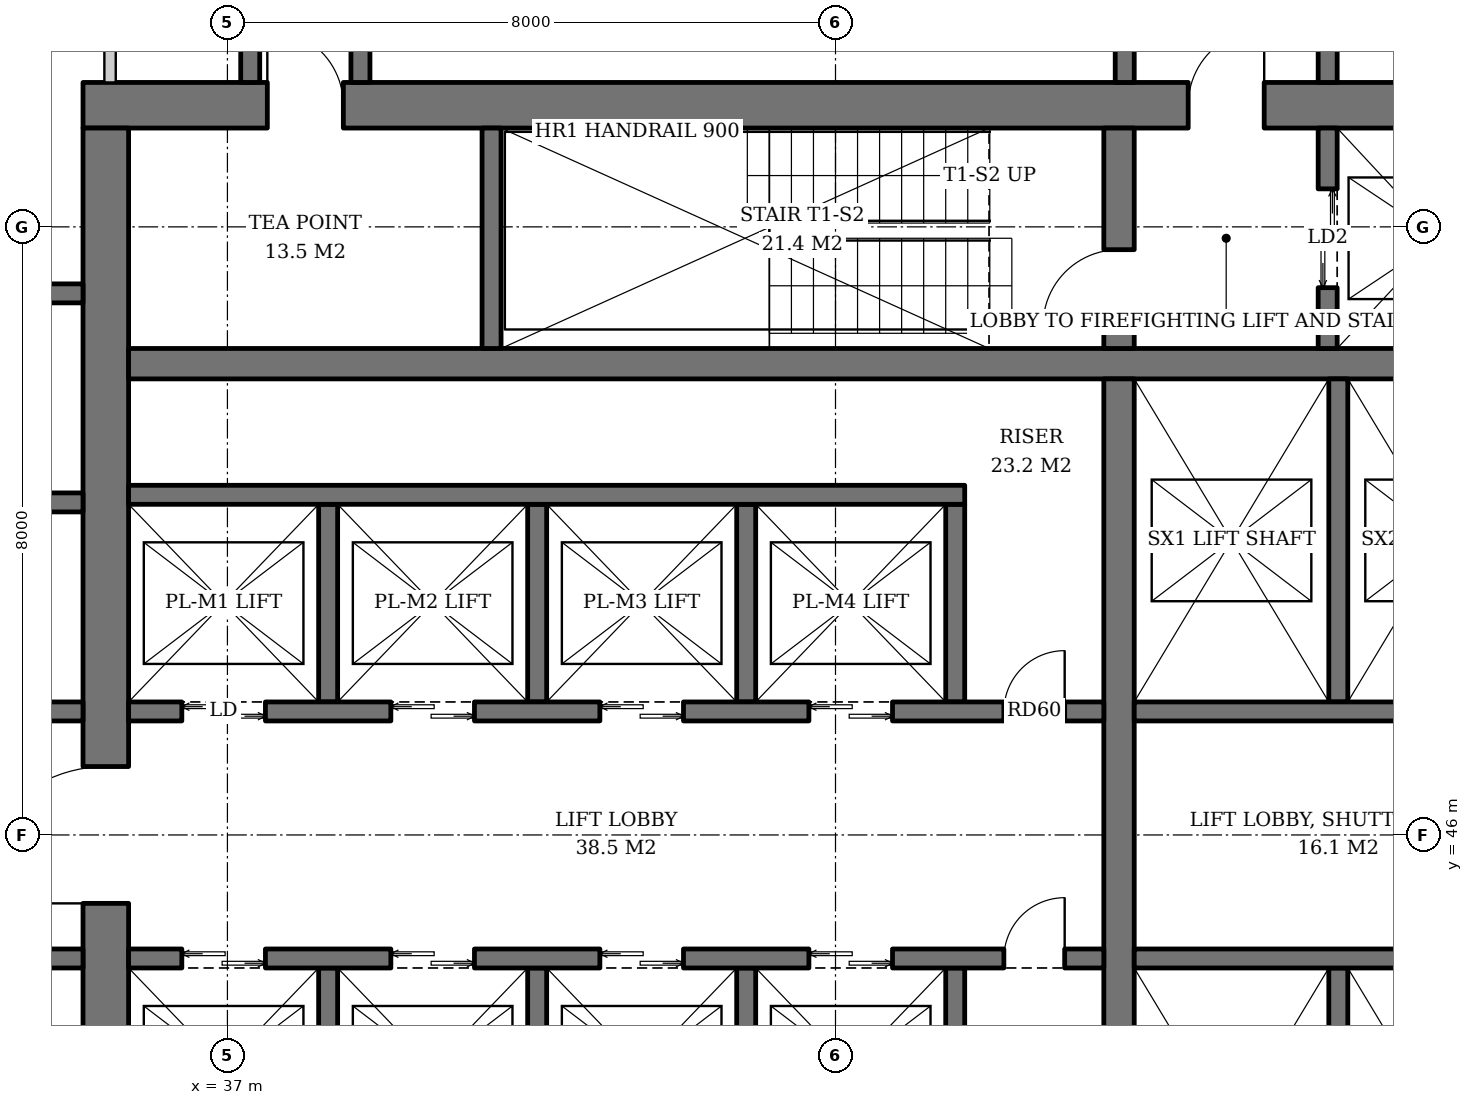
"""IFC4 building model, lengths in metres.
Left out: names, types, materials, properties, quantities, classifications, styles, units other than length and angle.
Written with IfcOpenShell. Run it as: python <this file> out.ifc"""

import sys

from ifc_helpers import new_model, si_unit, direction, frame, frame_2d, origin, place, context, subcontext, project, spatial, rectangle, extrude, element, fill, save


model = new_model("IFC4")
c1 = context("Model", 3, precision=1e-05, world=origin(), true_north=direction((0.0, 1.0)))
c2 = subcontext(c1, "Body", "Model", "MODEL_VIEW")
j1 = project(units=[si_unit("LENGTHUNIT", "METRE"), si_unit("PLANEANGLEUNIT", "RADIAN")], contexts=[c1])
p1 = place(None, origin())
s1 = spatial("IfcSite", under=j1, at=p1, CompositionType="ELEMENT")
p2 = place(p1, origin())
s2 = spatial("IfcBuilding", under=s1, at=p2, CompositionType="ELEMENT")
p3 = place(p2, frame((0.0, 0.0, 108.4)))
s3 = spatial("IfcBuildingStorey", under=s2, at=p3, CompositionType="ELEMENT", Elevation=108.4)
p4 = place(p3, frame((35.1, 55.6, 0.0), z_axis=(0.0, 0.0, 1.0), x_axis=(1.0, 0.0, 0.0)))
e1 = element("IfcWall", 1, at=p4, inside=s3, PredefinedType="SHEAR", context=c2, shape_type="SweptSolid", body=[
    extrude(rectangle(XDim=19.8, YDim=0.6, at=frame_2d((9.9, 0.0))), origin(), (0.0, 0.0, 1.0), 3.8),
])
p5 = place(p4, frame((14.54, 0.0, 0.0)))
e2 = element("IfcOpeningElement", 2, at=p5, cuts=e1, PredefinedType="OPENING", context=c2, shape_type="SweptSolid", body=[
    extrude(rectangle(XDim=1.0, YDim=2.1, at=frame_2d((0.5, 1.05))), frame((0.0, 0.31, 0.0), z_axis=(0.0, -1.0, 0.0), x_axis=(1.0, 0.0, 0.0)), (0.0, 0.0, 1.0), 0.62),
])
p6 = place(p4, frame((2.425, 0.0, 0.0)))
e3 = element("IfcOpeningElement", 3, at=p6, cuts=e1, PredefinedType="OPENING", context=c2, shape_type="SweptSolid", body=[
    extrude(rectangle(XDim=1.0, YDim=2.1, at=frame_2d((0.5, 1.05))), frame((0.0, 0.31, 0.0), z_axis=(0.0, -1.0, 0.0), x_axis=(1.0, 0.0, 0.0)), (0.0, 0.0, 1.0), 0.62),
])
p7 = place(p3, frame((35.4, 36.7, 0.0), z_axis=(0.0, 0.0, 1.0), x_axis=(0.0, 1.0, 0.0)))
e4 = element("IfcWall", 4, at=p7, inside=s3, PredefinedType="SHEAR", context=c2, shape_type="SweptSolid", body=[
    extrude(rectangle(XDim=18.6, YDim=0.6, at=frame_2d((9.3, 0.0))), origin(), (0.0, 0.0, 1.0), 3.8),
])
p8 = place(p7, frame((8.4, 0.0, 0.0)))
e5 = element("IfcOpeningElement", 5, at=p8, cuts=e4, PredefinedType="OPENING", context=c2, shape_type="SweptSolid", body=[
    extrude(rectangle(XDim=1.8, YDim=2.4, at=frame_2d((0.9, 1.2))), frame((0.0, 0.31, 0.0), z_axis=(0.0, -1.0, 0.0), x_axis=(1.0, 0.0, 0.0)), (0.0, 0.0, 1.0), 0.62),
])
p9 = place(p3, frame((35.7, 52.2, 0.0), z_axis=(0.0, 0.0, 1.0), x_axis=(1.0, 0.0, 0.0)))
e6 = element("IfcWall", 6, at=p9, inside=s3, PredefinedType="SHEAR", context=c2, shape_type="SweptSolid", body=[
    extrude(rectangle(XDim=18.6, YDim=0.4, at=frame_2d((9.3, 0.0))), origin(), (0.0, 0.0, 1.0), 3.8),
])
p10 = place(p3, frame((48.73, 40.0, 0.0), z_axis=(0.0, 0.0, 1.0), x_axis=(0.0, 1.0, 0.0)))
e7 = element("IfcWall", 7, at=p10, inside=s3, PredefinedType="SHEAR", context=c2, shape_type="SweptSolid", body=[
    extrude(rectangle(XDim=12.0, YDim=0.4, at=frame_2d((6.0, 0.0))), origin(), (0.0, 0.0, 1.0), 3.8),
])
p11 = place(p3, frame((48.73, 52.4, 0.0), z_axis=(0.0, 0.0, 1.0), x_axis=(0.0, 1.0, 0.0)))
e8 = element("IfcWall", 8, at=p11, inside=s3, PredefinedType="SHEAR", context=c2, shape_type="SweptSolid", body=[
    extrude(rectangle(XDim=2.9, YDim=0.4, at=frame_2d((1.45, 0.0))), origin(), (0.0, 0.0, 1.0), 3.8),
])
p12 = place(p11, frame((0.3, 0.0, 0.0)))
e9 = element("IfcOpeningElement", 9, at=p12, cuts=e8, PredefinedType="OPENING", context=c2, shape_type="SweptSolid", body=[
    extrude(rectangle(XDim=1.0, YDim=2.1, at=frame_2d((0.5, 1.05))), frame((0.0, 0.21, 0.0), z_axis=(0.0, -1.0, 0.0), x_axis=(1.0, 0.0, 0.0)), (0.0, 0.0, 1.0), 0.42),
])
p13 = place(p3, frame((40.475, 52.4, 0.0), z_axis=(0.0, 0.0, 1.0), x_axis=(0.0, 1.0, 0.0)))
e10 = element("IfcWall", 10, at=p13, inside=s3, PredefinedType="SHEAR", context=c2, shape_type="SweptSolid", body=[
    extrude(rectangle(XDim=2.9, YDim=0.25, at=frame_2d((1.45, 0.0))), origin(), (0.0, 0.0, 1.0), 3.8),
])
p14 = place(p3, frame((51.475, 52.4, 0.0), z_axis=(0.0, 0.0, 1.0), x_axis=(0.0, 1.0, 0.0)))
e11 = element("IfcWall", 11, at=p14, inside=s3, PredefinedType="SHEAR", context=c2, shape_type="SweptSolid", body=[
    extrude(rectangle(XDim=2.9, YDim=0.25, at=frame_2d((1.45, 0.0))), origin(), (0.0, 0.0, 1.0), 3.8),
])
p15 = place(p14, frame((0.8, 0.0, 0.0)))
e12 = element("IfcOpeningElement", 12, at=p15, cuts=e11, PredefinedType="OPENING", context=c2, shape_type="SweptSolid", body=[
    extrude(rectangle(XDim=1.3, YDim=2.2, at=frame_2d((0.65, 1.1))), frame((0.0, 0.135, 0.0), z_axis=(0.0, -1.0, 0.0), x_axis=(1.0, 0.0, 0.0)), (0.0, 0.0, 1.0), 0.27),
])
for number, where, z_axis, x_axis in (
    (13, (38.325, 47.75, 0.0), (0.0, 0.0, 1.0), (0.0, 1.0, 0.0)),
    (14, (41.075, 47.75, 0.0), (0.0, 0.0, 1.0), (0.0, 1.0, 0.0)),
    (15, (43.825, 47.75, 0.0), (0.0, 0.0, 1.0), (0.0, 1.0, 0.0)),
    (16, (46.575, 47.75, 0.0), (0.0, 0.0, 1.0), (0.0, 1.0, 0.0)),
):
    element("IfcWall", number, at=place(p3, frame(where, z_axis=z_axis, x_axis=x_axis)), inside=s3, PredefinedType="SHEAR", context=c2, shape_type="SweptSolid", body=[
        extrude(rectangle(XDim=2.6, YDim=0.25, at=frame_2d((1.3, 0.0))), origin(), (0.0, 0.0, 1.0), 3.8),
    ])
p16 = place(p3, frame((35.7, 50.475, 0.0), z_axis=(0.0, 0.0, 1.0), x_axis=(1.0, 0.0, 0.0)))
e17 = element("IfcWall", 17, at=p16, inside=s3, PredefinedType="SHEAR", context=c2, shape_type="SweptSolid", body=[
    extrude(rectangle(XDim=11.0, YDim=0.25, at=frame_2d((5.5, 0.0))), origin(), (0.0, 0.0, 1.0), 3.8),
])
p17 = place(p3, frame((35.7, 47.625, 0.0), z_axis=(0.0, 0.0, 1.0), x_axis=(1.0, 0.0, 0.0)))
e18 = element("IfcWall", 18, at=p17, inside=s3, PredefinedType="SHEAR", context=c2, shape_type="SweptSolid", body=[
    extrude(rectangle(XDim=12.83, YDim=0.25, at=frame_2d((6.415, 0.0))), origin(), (0.0, 0.0, 1.0), 3.8),
])
p18 = place(p17, frame((0.7, 0.0, 0.0)))
e19 = element("IfcOpeningElement", 19, at=p18, cuts=e18, PredefinedType="OPENING", context=c2, shape_type="SweptSolid", body=[
    extrude(rectangle(XDim=1.1, YDim=2.2, at=frame_2d((0.55, 1.1))), frame((0.0, 0.135, 0.0), z_axis=(0.0, -1.0, 0.0), x_axis=(1.0, 0.0, 0.0)), (0.0, 0.0, 1.0), 0.27),
])
p19 = place(p17, frame((3.45, 0.0, 0.0)))
e20 = element("IfcOpeningElement", 20, at=p19, cuts=e18, PredefinedType="OPENING", context=c2, shape_type="SweptSolid", body=[
    extrude(rectangle(XDim=1.1, YDim=2.2, at=frame_2d((0.55, 1.1))), frame((0.0, 0.135, 0.0), z_axis=(0.0, -1.0, 0.0), x_axis=(1.0, 0.0, 0.0)), (0.0, 0.0, 1.0), 0.27),
])
p20 = place(p17, frame((6.2, 0.0, 0.0)))
e21 = element("IfcOpeningElement", 21, at=p20, cuts=e18, PredefinedType="OPENING", context=c2, shape_type="SweptSolid", body=[
    extrude(rectangle(XDim=1.1, YDim=2.2, at=frame_2d((0.55, 1.1))), frame((0.0, 0.135, 0.0), z_axis=(0.0, -1.0, 0.0), x_axis=(1.0, 0.0, 0.0)), (0.0, 0.0, 1.0), 0.27),
])
p21 = place(p17, frame((8.95, 0.0, 0.0)))
e22 = element("IfcOpeningElement", 22, at=p21, cuts=e18, PredefinedType="OPENING", context=c2, shape_type="SweptSolid", body=[
    extrude(rectangle(XDim=1.1, YDim=2.2, at=frame_2d((0.55, 1.1))), frame((0.0, 0.135, 0.0), z_axis=(0.0, -1.0, 0.0), x_axis=(1.0, 0.0, 0.0)), (0.0, 0.0, 1.0), 0.27),
])
p22 = place(p17, frame((11.515, 0.0, 0.0)))
e23 = element("IfcOpeningElement", 23, at=p22, cuts=e18, PredefinedType="OPENING", context=c2, shape_type="SweptSolid", body=[
    extrude(rectangle(XDim=0.8, YDim=2.0, at=frame_2d((0.4, 1.0))), frame((0.0, 0.135, 0.0), z_axis=(0.0, -1.0, 0.0), x_axis=(1.0, 0.0, 0.0)), (0.0, 0.0, 1.0), 0.27),
])
for number, where, z_axis, x_axis in (
    (24, (38.325, 44.25, 0.0), (0.0, 0.0, 1.0), (0.0, -1.0, 0.0)),
    (25, (41.075, 44.25, 0.0), (0.0, 0.0, 1.0), (0.0, -1.0, 0.0)),
    (26, (43.825, 44.25, 0.0), (0.0, 0.0, 1.0), (0.0, -1.0, 0.0)),
    (27, (46.575, 44.25, 0.0), (0.0, 0.0, 1.0), (0.0, -1.0, 0.0)),
):
    element("IfcWall", number, at=place(p3, frame(where, z_axis=z_axis, x_axis=x_axis)), inside=s3, PredefinedType="SHEAR", context=c2, shape_type="SweptSolid", body=[
        extrude(rectangle(XDim=2.6, YDim=0.25, at=frame_2d((1.3, 0.0))), origin(), (0.0, 0.0, 1.0), 3.8),
    ])
p23 = place(p3, frame((35.7, 44.375, 0.0), z_axis=(0.0, 0.0, 1.0), x_axis=(1.0, 0.0, 0.0)))
e28 = element("IfcWall", 28, at=p23, inside=s3, PredefinedType="SHEAR", context=c2, shape_type="SweptSolid", body=[
    extrude(rectangle(XDim=12.83, YDim=0.25, at=frame_2d((6.415, 0.0))), origin(), (0.0, 0.0, 1.0), 3.8),
])
p24 = place(p23, frame((0.7, 0.0, 0.0)))
e29 = element("IfcOpeningElement", 29, at=p24, cuts=e28, PredefinedType="OPENING", context=c2, shape_type="SweptSolid", body=[
    extrude(rectangle(XDim=1.1, YDim=2.2, at=frame_2d((0.55, 1.1))), frame((0.0, 0.135, 0.0), z_axis=(0.0, -1.0, 0.0), x_axis=(1.0, 0.0, 0.0)), (0.0, 0.0, 1.0), 0.27),
])
p25 = place(p23, frame((3.45, 0.0, 0.0)))
e30 = element("IfcOpeningElement", 30, at=p25, cuts=e28, PredefinedType="OPENING", context=c2, shape_type="SweptSolid", body=[
    extrude(rectangle(XDim=1.1, YDim=2.2, at=frame_2d((0.55, 1.1))), frame((0.0, 0.135, 0.0), z_axis=(0.0, -1.0, 0.0), x_axis=(1.0, 0.0, 0.0)), (0.0, 0.0, 1.0), 0.27),
])
p26 = place(p23, frame((6.2, 0.0, 0.0)))
e31 = element("IfcOpeningElement", 31, at=p26, cuts=e28, PredefinedType="OPENING", context=c2, shape_type="SweptSolid", body=[
    extrude(rectangle(XDim=1.1, YDim=2.2, at=frame_2d((0.55, 1.1))), frame((0.0, 0.135, 0.0), z_axis=(0.0, -1.0, 0.0), x_axis=(1.0, 0.0, 0.0)), (0.0, 0.0, 1.0), 0.27),
])
p27 = place(p23, frame((8.95, 0.0, 0.0)))
e32 = element("IfcOpeningElement", 32, at=p27, cuts=e28, PredefinedType="OPENING", context=c2, shape_type="SweptSolid", body=[
    extrude(rectangle(XDim=1.1, YDim=2.2, at=frame_2d((0.55, 1.1))), frame((0.0, 0.135, 0.0), z_axis=(0.0, -1.0, 0.0), x_axis=(1.0, 0.0, 0.0)), (0.0, 0.0, 1.0), 0.27),
])
p28 = place(p23, frame((11.515, 0.0, 0.0)))
e33 = element("IfcOpeningElement", 33, at=p28, cuts=e28, PredefinedType="OPENING", context=c2, shape_type="SweptSolid", body=[
    extrude(rectangle(XDim=0.8, YDim=2.0, at=frame_2d((0.4, 1.0))), frame((0.0, 0.135, 0.0), z_axis=(0.0, -1.0, 0.0), x_axis=(1.0, 0.0, 0.0)), (0.0, 0.0, 1.0), 0.27),
])
p29 = place(p3, frame((51.615, 47.75, 0.0), z_axis=(0.0, 0.0, 1.0), x_axis=(0.0, 1.0, 0.0)))
e34 = element("IfcWall", 34, at=p29, inside=s3, PredefinedType="SHEAR", context=c2, shape_type="SweptSolid", body=[
    extrude(rectangle(XDim=4.25, YDim=0.25, at=frame_2d((2.125, 0.0))), origin(), (0.0, 0.0, 1.0), 3.8),
])
p30 = place(p3, frame((48.93, 47.625, 0.0), z_axis=(0.0, 0.0, 1.0), x_axis=(1.0, 0.0, 0.0)))
e35 = element("IfcWall", 35, at=p30, inside=s3, PredefinedType="SHEAR", context=c2, shape_type="SweptSolid", body=[
    extrude(rectangle(XDim=5.37, YDim=0.25, at=frame_2d((2.685, 0.0))), origin(), (0.0, 0.0, 1.0), 3.8),
])
p31 = place(p3, frame((51.615, 44.25, 0.0), z_axis=(0.0, 0.0, 1.0), x_axis=(0.0, -1.0, 0.0)))
e36 = element("IfcWall", 36, at=p31, inside=s3, PredefinedType="SHEAR", context=c2, shape_type="SweptSolid", body=[
    extrude(rectangle(XDim=4.25, YDim=0.25, at=frame_2d((2.125, 0.0))), origin(), (0.0, 0.0, 1.0), 3.8),
])
p32 = place(p3, frame((48.93, 44.375, 0.0), z_axis=(0.0, 0.0, 1.0), x_axis=(1.0, 0.0, 0.0)))
e37 = element("IfcWall", 37, at=p32, inside=s3, PredefinedType="SHEAR", context=c2, shape_type="SweptSolid", body=[
    extrude(rectangle(XDim=5.37, YDim=0.25, at=frame_2d((2.685, 0.0))), origin(), (0.0, 0.0, 1.0), 3.8),
])
for number, where, z_axis, x_axis in (
    (38, (32.4, 44.375, 0.0), (0.0, 0.0, 1.0), (1.0, 0.0, 0.0)),
    (39, (32.4, 47.625, 0.0), (0.0, 0.0, 1.0), (1.0, 0.0, 0.0)),
    (40, (32.4, 50.375, 0.0), (0.0, 0.0, 1.0), (1.0, 0.0, 0.0)),
    (41, (32.4, 53.125, 0.0), (0.0, 0.0, 1.0), (1.0, 0.0, 0.0)),
):
    element("IfcWall", number, at=place(p3, frame(where, z_axis=z_axis, x_axis=x_axis)), inside=s3, PredefinedType="SHEAR", context=c2, shape_type="SweptSolid", body=[
        extrude(rectangle(XDim=2.7, YDim=0.25, at=frame_2d((1.35, 0.0))), origin(), (0.0, 0.0, 1.0), 3.8),
    ])
for number, where, z_axis, x_axis in (
    (42, (48.805, 55.9, 0.0), (0.0, 0.0, 1.0), (0.0, 1.0, 0.0)),
    (43, (51.475, 55.9, 0.0), (0.0, 0.0, 1.0), (0.0, 1.0, 0.0)),
    (44, (37.3, 55.9, 0.0), (0.0, 0.0, 1.0), (0.0, 1.0, 0.0)),
    (45, (38.75, 55.9, 0.0), (0.0, 0.0, 1.0), (0.0, 1.0, 0.0)),
):
    element("IfcWall", number, at=place(p3, frame(where, z_axis=z_axis, x_axis=x_axis)), inside=s3, PredefinedType="SOLIDWALL", context=c2, shape_type="SweptSolid", body=[
        extrude(rectangle(XDim=2.7, YDim=0.25, at=frame_2d((1.35, 0.0))), origin(), (0.0, 0.0, 1.0), 3.62),
    ])
p33 = place(p3, frame((35.456, 55.9, 0.0), z_axis=(0.0, 0.0, 1.0), x_axis=(0.0, 1.0, 0.0)))
e46 = element("IfcWall", 46, at=p33, inside=s3, PredefinedType="SOLIDWALL", context=c2, shape_type="SweptSolid", body=[
    extrude(rectangle(XDim=2.7, YDim=0.15, at=frame_2d((1.35, 0.0))), origin(), (0.0, 0.0, 1.0), 3.62),
])
p34 = place(p15, origin())
e47 = element("IfcDoor", 47, at=p34, inside=s3, OperationType="DOUBLE_DOOR_SLIDING", PredefinedType="DOOR", context=c2, shape_type="SweptSolid", body=[
    extrude(rectangle(XDim=1.3, YDim=2.2, at=frame_2d((0.65, 1.1))), frame((0.0, 0.025, 0.0), z_axis=(0.0, -1.0, 0.0), x_axis=(1.0, 0.0, 0.0)), (0.0, 0.0, 1.0), 0.05),
])
fill(e12, e47)
p35 = place(p18, origin())
e48 = element("IfcDoor", 48, at=p35, inside=s3, OperationType="DOUBLE_DOOR_SLIDING", PredefinedType="DOOR", context=c2, shape_type="SweptSolid", body=[
    extrude(rectangle(XDim=1.1, YDim=2.2, at=frame_2d((0.55, 1.1))), frame((0.0, 0.025, 0.0), z_axis=(0.0, -1.0, 0.0), x_axis=(1.0, 0.0, 0.0)), (0.0, 0.0, 1.0), 0.05),
])
fill(e19, e48)
p36 = place(p19, origin())
e49 = element("IfcDoor", 49, at=p36, inside=s3, OperationType="DOUBLE_DOOR_SLIDING", PredefinedType="DOOR", context=c2, shape_type="SweptSolid", body=[
    extrude(rectangle(XDim=1.1, YDim=2.2, at=frame_2d((0.55, 1.1))), frame((0.0, 0.025, 0.0), z_axis=(0.0, -1.0, 0.0), x_axis=(1.0, 0.0, 0.0)), (0.0, 0.0, 1.0), 0.05),
])
fill(e20, e49)
p37 = place(p20, origin())
e50 = element("IfcDoor", 50, at=p37, inside=s3, OperationType="DOUBLE_DOOR_SLIDING", PredefinedType="DOOR", context=c2, shape_type="SweptSolid", body=[
    extrude(rectangle(XDim=1.1, YDim=2.2, at=frame_2d((0.55, 1.1))), frame((0.0, 0.025, 0.0), z_axis=(0.0, -1.0, 0.0), x_axis=(1.0, 0.0, 0.0)), (0.0, 0.0, 1.0), 0.05),
])
fill(e21, e50)
p38 = place(p21, origin())
e51 = element("IfcDoor", 51, at=p38, inside=s3, OperationType="DOUBLE_DOOR_SLIDING", PredefinedType="DOOR", context=c2, shape_type="SweptSolid", body=[
    extrude(rectangle(XDim=1.1, YDim=2.2, at=frame_2d((0.55, 1.1))), frame((0.0, 0.025, 0.0), z_axis=(0.0, -1.0, 0.0), x_axis=(1.0, 0.0, 0.0)), (0.0, 0.0, 1.0), 0.05),
])
fill(e22, e51)
p39 = place(p22, origin())
e52 = element("IfcDoor", 52, at=p39, inside=s3, OperationType="SINGLE_SWING_RIGHT", PredefinedType="DOOR", context=c2, shape_type="SweptSolid", body=[
    extrude(rectangle(XDim=0.8, YDim=2.0, at=frame_2d((0.4, 1.0))), frame((0.0, 0.025, 0.0), z_axis=(0.0, -1.0, 0.0), x_axis=(1.0, 0.0, 0.0)), (0.0, 0.0, 1.0), 0.05),
])
fill(e23, e52)
p40 = place(p24, origin())
e53 = element("IfcDoor", 53, at=p40, inside=s3, OperationType="DOUBLE_DOOR_SLIDING", PredefinedType="DOOR", context=c2, shape_type="SweptSolid", body=[
    extrude(rectangle(XDim=1.1, YDim=2.2, at=frame_2d((0.55, 1.1))), frame((0.0, 0.025, 0.0), z_axis=(0.0, -1.0, 0.0), x_axis=(1.0, 0.0, 0.0)), (0.0, 0.0, 1.0), 0.05),
])
fill(e29, e53)
p41 = place(p25, origin())
e54 = element("IfcDoor", 54, at=p41, inside=s3, OperationType="DOUBLE_DOOR_SLIDING", PredefinedType="DOOR", context=c2, shape_type="SweptSolid", body=[
    extrude(rectangle(XDim=1.1, YDim=2.2, at=frame_2d((0.55, 1.1))), frame((0.0, 0.025, 0.0), z_axis=(0.0, -1.0, 0.0), x_axis=(1.0, 0.0, 0.0)), (0.0, 0.0, 1.0), 0.05),
])
fill(e30, e54)
p42 = place(p26, origin())
e55 = element("IfcDoor", 55, at=p42, inside=s3, OperationType="DOUBLE_DOOR_SLIDING", PredefinedType="DOOR", context=c2, shape_type="SweptSolid", body=[
    extrude(rectangle(XDim=1.1, YDim=2.2, at=frame_2d((0.55, 1.1))), frame((0.0, 0.025, 0.0), z_axis=(0.0, -1.0, 0.0), x_axis=(1.0, 0.0, 0.0)), (0.0, 0.0, 1.0), 0.05),
])
fill(e31, e55)
p43 = place(p27, origin())
e56 = element("IfcDoor", 56, at=p43, inside=s3, OperationType="DOUBLE_DOOR_SLIDING", PredefinedType="DOOR", context=c2, shape_type="SweptSolid", body=[
    extrude(rectangle(XDim=1.1, YDim=2.2, at=frame_2d((0.55, 1.1))), frame((0.0, 0.025, 0.0), z_axis=(0.0, -1.0, 0.0), x_axis=(1.0, 0.0, 0.0)), (0.0, 0.0, 1.0), 0.05),
])
fill(e32, e56)
p44 = place(p28, origin())
e57 = element("IfcDoor", 57, at=p44, inside=s3, OperationType="SINGLE_SWING_RIGHT", PredefinedType="DOOR", context=c2, shape_type="SweptSolid", body=[
    extrude(rectangle(XDim=0.8, YDim=2.0, at=frame_2d((0.4, 1.0))), frame((0.0, 0.025, 0.0), z_axis=(0.0, -1.0, 0.0), x_axis=(1.0, 0.0, 0.0)), (0.0, 0.0, 1.0), 0.05),
])
fill(e33, e57)
p45 = place(p12, origin())
e58 = element("IfcDoor", 58, at=p45, inside=s3, OperationType="SINGLE_SWING_LEFT", PredefinedType="DOOR", context=c2, shape_type="SweptSolid", body=[
    extrude(rectangle(XDim=1.0, YDim=2.1, at=frame_2d((0.5, 1.05))), frame((0.0, 0.025, 0.0), z_axis=(0.0, -1.0, 0.0), x_axis=(1.0, 0.0, 0.0)), (0.0, 0.0, 1.0), 0.05),
])
fill(e9, e58)
p46 = place(p5, origin())
e59 = element("IfcDoor", 59, at=p46, inside=s3, OperationType="SINGLE_SWING_RIGHT", PredefinedType="DOOR", context=c2, shape_type="SweptSolid", body=[
    extrude(rectangle(XDim=1.0, YDim=2.1, at=frame_2d((0.5, 1.05))), frame((0.0, 0.025, 0.0), z_axis=(0.0, -1.0, 0.0), x_axis=(1.0, 0.0, 0.0)), (0.0, 0.0, 1.0), 0.05),
])
fill(e2, e59)
p47 = place(p8, origin())
e60 = element("IfcDoor", 60, at=p47, inside=s3, OperationType="DOUBLE_DOOR_SINGLE_SWING", PredefinedType="DOOR", context=c2, shape_type="SweptSolid", body=[
    extrude(rectangle(XDim=1.8, YDim=2.4, at=frame_2d((0.9, 1.2))), frame((0.0, 0.025, 0.0), z_axis=(0.0, -1.0, 0.0), x_axis=(1.0, 0.0, 0.0)), (0.0, 0.0, 1.0), 0.05),
])
fill(e5, e60)
p48 = place(p6, origin())
e61 = element("IfcDoor", 61, at=p48, inside=s3, OperationType="SINGLE_SWING_LEFT", PredefinedType="DOOR", context=c2, shape_type="SweptSolid", body=[
    extrude(rectangle(XDim=1.0, YDim=2.1, at=frame_2d((0.5, 1.05))), frame((0.0, -0.24, 0.0), z_axis=(0.0, -1.0, 0.0), x_axis=(1.0, 0.0, 0.0)), (0.0, 0.0, 1.0), 0.05),
])
fill(e3, e61)
save(model, sys.argv[1])
